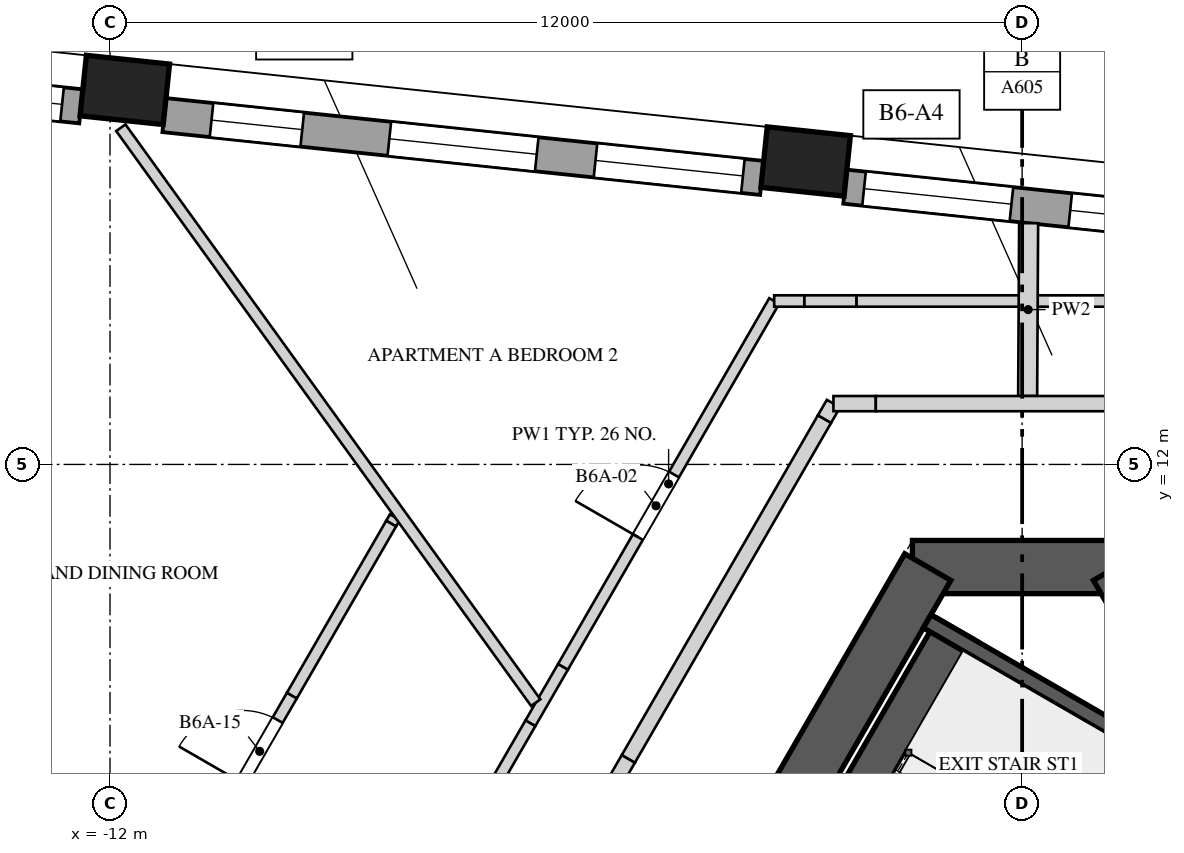
"""IFC4 building model, lengths in metres.
Left out: names, types, materials, properties, quantities, classifications, styles, units other than length and angle.
Written with IfcOpenShell. Run it as: python <this file> out.ifc"""

import sys

from ifc_helpers import new_model, si_unit, direction, frame, frame_2d, origin, origin_2d, place, context, subcontext, project, spatial, polyline, rectangle, outline, extrude, element, fill, save


model = new_model("IFC4")
c1 = context("Model", 3, precision=1e-05, world=origin(), true_north=direction((0.0, 1.0)))
c2 = subcontext(c1, "Body", "Model", "MODEL_VIEW")
j1 = project(units=[si_unit("LENGTHUNIT", "METRE"), si_unit("PLANEANGLEUNIT", "RADIAN")], contexts=[c1])
p1 = place(None, origin())
s1 = spatial("IfcSite", under=j1, at=p1, CompositionType="ELEMENT")
p2 = place(p1, origin())
s2 = spatial("IfcBuilding", under=s1, at=p2, CompositionType="ELEMENT")
p3 = place(p2, frame((0.0, 0.0, 241.2)))
s3 = spatial("IfcBuildingStorey", under=s2, at=p3, CompositionType="ELEMENT", Elevation=241.2)
p4 = place(p3, frame((1.443, 10.65, 0.0), z_axis=(0.0, 0.0, 1.0), x_axis=(-1.0, 0.0, 0.0)))
e1 = element("IfcWall", 1, at=p4, inside=s3, PredefinedType="SHEAR", context=c2, shape_type="SweptSolid", body=[
    extrude(rectangle(XDim=2.887, YDim=0.7, at=frame_2d((1.443, 0.0))), origin(), (0.0, 0.0, 1.0), 4.0),
])
p5 = place(p3, frame((-1.241, 10.65, 0.0), z_axis=(0.0, 0.0, 1.0), x_axis=(-0.500003331888, -0.866023480109, 0.0)))
e2 = element("IfcWall", 2, at=p5, inside=s3, PredefinedType="SHEAR", context=c2, shape_type="SweptSolid", body=[
    extrude(rectangle(XDim=17.205, YDim=0.7, at=frame_2d((8.603, 0.0))), origin(), (0.0, 0.0, 1.0), 4.0),
])
p6 = place(p5, frame((6.808, 0.0, 0.0)))
e3 = element("IfcOpeningElement", 3, at=p6, cuts=e2, PredefinedType="OPENING", context=c2, shape_type="SweptSolid", body=[
    extrude(rectangle(XDim=1.0, YDim=2.4, at=frame_2d((0.5, 1.2))), frame((0.0, 0.36, 0.0), z_axis=(0.0, -1.0, 0.0), x_axis=(1.0, 0.0, 0.0)), (0.0, 0.0, 1.0), 0.72),
])
p7 = place(p5, frame((14.922, 0.0, 0.0)))
e4 = element("IfcOpeningElement", 4, at=p7, cuts=e2, PredefinedType="OPENING", context=c2, shape_type="SweptSolid", body=[
    extrude(rectangle(XDim=0.8, YDim=2.1, at=frame_2d((0.4, 1.05))), frame((0.0, 0.36, 0.0), z_axis=(0.0, -1.0, 0.0), x_axis=(1.0, 0.0, 0.0)), (0.0, 0.0, 1.0), 0.72),
])
p8 = place(p3, frame((9.844, -4.25, 0.0), z_axis=(0.0, 0.0, 1.0), x_axis=(-0.500003331888, 0.866023480109, 0.0)))
e5 = element("IfcWall", 5, at=p8, inside=s3, PredefinedType="SHEAR", context=c2, shape_type="SweptSolid", body=[
    extrude(rectangle(XDim=17.205, YDim=0.7, at=frame_2d((8.603, 0.0))), origin(), (0.0, 0.0, 1.0), 4.0),
])
p9 = place(p8, frame((6.877, 0.0, 0.0)))
e6 = element("IfcOpeningElement", 6, at=p9, cuts=e5, PredefinedType="OPENING", context=c2, shape_type="SweptSolid", body=[
    extrude(rectangle(XDim=1.0, YDim=2.4, at=frame_2d((0.5, 1.2))), frame((0.0, 0.36, 0.0), z_axis=(0.0, -1.0, 0.0), x_axis=(1.0, 0.0, 0.0)), (0.0, 0.0, 1.0), 0.72),
])
for number, where, z_axis, x_axis in (
    (7, (-2.848, 15.985, 0.0), (0.0, 0.0, 1.0), (-0.995, 0.105, 0.0)),
    (8, (-11.805, 16.927, 0.0), (0.0, 0.0, 1.0), (-0.995, 0.105, 0.0)),
):
    element("IfcColumn", number, at=place(p3, frame(where, z_axis=z_axis, x_axis=x_axis)), inside=s3, PredefinedType="COLUMN", context=c2, shape_type="SweptSolid", body=[
        extrude(rectangle(XDim=1.1, YDim=0.8, at=origin_2d()), origin(), (0.0, 0.0, 1.0), 4.0),
    ])
p10 = place(p3, frame((5.534, 14.828, 0.0), z_axis=(0.0, 0.0, 1.0), x_axis=(-0.994522865711, 0.104519230663, 0.0)))
e9 = element("IfcWall", 9, at=p10, inside=s3, PredefinedType="SOLIDWALL", context=c2, shape_type="SweptSolid", body=[
    extrude(rectangle(XDim=7.907, YDim=0.45, at=frame_2d((3.953, 0.0))), origin(), (0.0, 0.0, 1.0), 3.3),
])
p11 = place(p10, frame((0.251, 0.0, 0.4)))
e10 = element("IfcOpeningElement", 10, at=p11, cuts=e9, PredefinedType="OPENING", context=c2, shape_type="SweptSolid", body=[
    extrude(rectangle(XDim=1.95, YDim=2.75, at=frame_2d((0.975, 1.375))), frame((0.0, 0.235, 0.0), z_axis=(0.0, -1.0, 0.0), x_axis=(1.0, 0.0, 0.0)), (0.0, 0.0, 1.0), 0.47),
])
p12 = place(p10, frame((2.978, 0.0, 0.4)))
e11 = element("IfcOpeningElement", 11, at=p12, cuts=e9, PredefinedType="OPENING", context=c2, shape_type="SweptSolid", body=[
    extrude(rectangle(XDim=1.95, YDim=2.75, at=frame_2d((0.975, 1.375))), frame((0.0, 0.235, 0.0), z_axis=(0.0, -1.0, 0.0), x_axis=(1.0, 0.0, 0.0)), (0.0, 0.0, 1.0), 0.47),
])
p13 = place(p10, frame((5.706, 0.0, 0.4)))
e12 = element("IfcOpeningElement", 12, at=p13, cuts=e9, PredefinedType="OPENING", context=c2, shape_type="SweptSolid", body=[
    extrude(rectangle(XDim=1.95, YDim=2.75, at=frame_2d((0.975, 1.375))), frame((0.0, 0.235, 0.0), z_axis=(0.0, -1.0, 0.0), x_axis=(1.0, 0.0, 0.0)), (0.0, 0.0, 1.0), 0.47),
])
p14 = place(p3, frame((-3.424, 15.769, 0.0), z_axis=(0.0, 0.0, 1.0), x_axis=(-0.994522528385, 0.104522440343, 0.0)))
e13 = element("IfcWall", 13, at=p14, inside=s3, PredefinedType="SOLIDWALL", context=c2, shape_type="SweptSolid", body=[
    extrude(rectangle(XDim=7.906, YDim=0.45, at=frame_2d((3.953, 0.0))), origin(), (0.0, 0.0, 1.0), 3.3),
])
p15 = place(p14, frame((0.251, 0.0, 0.4)))
e14 = element("IfcOpeningElement", 14, at=p15, cuts=e13, PredefinedType="OPENING", context=c2, shape_type="SweptSolid", body=[
    extrude(rectangle(XDim=1.95, YDim=2.75, at=frame_2d((0.975, 1.375))), frame((0.0, 0.235, 0.0), z_axis=(0.0, -1.0, 0.0), x_axis=(1.0, 0.0, 0.0)), (0.0, 0.0, 1.0), 0.47),
])
p16 = place(p14, frame((2.978, 0.0, 0.4)))
e15 = element("IfcOpeningElement", 15, at=p16, cuts=e13, PredefinedType="OPENING", context=c2, shape_type="SweptSolid", body=[
    extrude(rectangle(XDim=1.95, YDim=2.75, at=frame_2d((0.975, 1.375))), frame((0.0, 0.235, 0.0), z_axis=(0.0, -1.0, 0.0), x_axis=(1.0, 0.0, 0.0)), (0.0, 0.0, 1.0), 0.47),
])
p17 = place(p14, frame((6.081, 0.0, 0.4)))
e16 = element("IfcOpeningElement", 16, at=p17, cuts=e13, PredefinedType="OPENING", context=c2, shape_type="SweptSolid", body=[
    extrude(rectangle(XDim=1.2, YDim=2.75, at=frame_2d((0.6, 1.375))), frame((0.0, 0.235, 0.0), z_axis=(0.0, -1.0, 0.0), x_axis=(1.0, 0.0, 0.0)), (0.0, 0.0, 1.0), 0.47),
])
p18 = place(p3, frame((-12.381, 16.711, 0.0), z_axis=(0.0, 0.0, 1.0), x_axis=(-0.994520717537, 0.104539668977, 0.0)))
e17 = element("IfcWall", 17, at=p18, inside=s3, PredefinedType="SOLIDWALL", context=c2, shape_type="SweptSolid", body=[
    extrude(rectangle(XDim=2.452, YDim=0.45, at=frame_2d((1.226, 0.0))), origin(), (0.0, 0.0, 1.0), 3.3),
])
p19 = place(p18, frame((0.251, 0.0, 0.4)))
e18 = element("IfcOpeningElement", 18, at=p19, cuts=e17, PredefinedType="OPENING", context=c2, shape_type="SweptSolid", body=[
    extrude(rectangle(XDim=1.95, YDim=2.75, at=frame_2d((0.975, 1.375))), frame((0.0, 0.235, 0.0), z_axis=(0.0, -1.0, 0.0), x_axis=(1.0, 0.0, 0.0)), (0.0, 0.0, 1.0), 0.47),
])
p20 = place(p3, frame((-0.853, 9.823, 0.0), z_axis=(0.0, 0.0, 1.0), x_axis=(-0.500009909098, -0.866019682689, 0.0)))
e19 = element("IfcWall", 19, at=p20, inside=s3, PredefinedType="SOLIDWALL", context=c2, shape_type="SweptSolid", body=[
    extrude(rectangle(XDim=6.2, YDim=0.6, at=frame_2d((3.1, 0.0))), origin(), (0.0, 0.0, 1.0), 3.65),
])
p21 = place(p3, frame((1.876, 8.85, 0.0), z_axis=(0.0, 0.0, 1.0), x_axis=(-0.499998042495, -0.866026533947, 0.0)))
e20 = element("IfcWall", 20, at=p21, inside=s3, PredefinedType="SOLIDWALL", context=c2, shape_type="SweptSolid", body=[
    extrude(rectangle(XDim=6.723, YDim=0.2, at=frame_2d((3.361, 0.0))), origin(), (0.0, 0.0, 1.0), 3.65),
])
p22 = place(p3, frame((1.479, 8.361, 0.0), z_axis=(0.0, 0.0, 1.0), x_axis=(-0.866035871367, 0.499981869177, 0.0)))
e21 = element("IfcWall", 21, at=p22, inside=s3, PredefinedType="SOLIDWALL", context=c2, shape_type="SweptSolid", body=[
    extrude(rectangle(XDim=3.15, YDim=0.2, at=frame_2d((1.575, 0.0))), origin(), (0.0, 0.0, 1.0), 3.65),
])
p23 = place(p3, frame((-7.38, 7.017, 0.0), z_axis=(0.0, 0.0, 1.0), x_axis=(0.500012159746, 0.866018383238, 0.0)))
e22 = element("IfcWall", 22, at=p23, inside=s3, PredefinedType="PARTITIONING", context=c2, shape_type="SweptSolid", body=[
    extrude(rectangle(XDim=1.824, YDim=0.15, at=frame_2d((0.912, 0.0))), origin(), (0.0, 0.0, 1.0), 3.65),
])
p24 = place(p3, frame((-6.468, 8.597, 0.0), z_axis=(0.0, 0.0, 1.0), x_axis=(0.500035209441, 0.86600507465, 0.0)))
e23 = element("IfcWall", 23, at=p24, inside=s3, PredefinedType="PARTITIONING", context=c2, shape_type="SweptSolid", body=[
    extrude(rectangle(XDim=0.856, YDim=0.15, at=frame_2d((0.428, 0.0))), origin(), (0.0, 0.0, 1.0), 2.75),
])
p25 = place(p3, frame((-6.04, 9.338, 0.0), z_axis=(0.0, 0.0, 1.0), x_axis=(0.500014044516, 0.866017295027, 0.0)))
e24 = element("IfcWall", 24, at=p25, inside=s3, PredefinedType="PARTITIONING", context=c2, shape_type="SweptSolid", body=[
    extrude(rectangle(XDim=5.556, YDim=0.15, at=frame_2d((2.778, 0.0))), origin(), (0.0, 0.0, 1.0), 3.65),
])
p26 = place(p25, frame((1.971, 0.0, 0.0)))
e25 = element("IfcOpeningElement", 25, at=p26, cuts=e24, PredefinedType="OPENING", context=c2, shape_type="SweptSolid", body=[
    extrude(rectangle(XDim=0.95, YDim=2.4, at=frame_2d((0.475, 1.2))), frame((0.0, 0.085, 0.0), z_axis=(0.0, -1.0, 0.0), x_axis=(1.0, 0.0, 0.0)), (0.0, 0.0, 1.0), 0.17),
])
p27 = place(p3, frame((-10.294, 7.771, 0.0), z_axis=(0.0, 0.0, 1.0), x_axis=(0.500117582512, 0.865957506846, 0.0)))
e26 = element("IfcWall", 26, at=p27, inside=s3, PredefinedType="PARTITIONING", context=c2, shape_type="SweptSolid", body=[
    extrude(outline(polyline([(0.0, 0.0), (1.373, 0.0), (1.373, 2.55), (0.481, 2.55), (0.481, 3.65), (0.0, 3.65), (0.0, 0.0)])), frame((0.0, 0.075, 0.0), z_axis=(0.0, -1.0, 0.0), x_axis=(1.0, 0.0, 0.0)), (0.0, 0.0, 1.0), 0.15),
])
p28 = place(p27, frame((0.05, 0.0, 0.0)))
e27 = element("IfcOpeningElement", 27, at=p28, cuts=e26, PredefinedType="OPENING", context=c2, shape_type="SweptSolid", body=[
    extrude(rectangle(XDim=0.95, YDim=2.4, at=frame_2d((0.475, 1.2))), frame((0.0, 0.085, 0.0), z_axis=(0.0, -1.0, 0.0), x_axis=(1.0, 0.0, 0.0)), (0.0, 0.0, 1.0), 0.17),
])
p29 = place(p3, frame((-9.607, 8.96, 0.0), z_axis=(0.0, 0.0, 1.0), x_axis=(0.49994612994, 0.866056503444, 0.0)))
e28 = element("IfcWall", 28, at=p29, inside=s3, PredefinedType="PARTITIONING", context=c2, shape_type="SweptSolid", body=[
    extrude(rectangle(XDim=2.614, YDim=0.15, at=frame_2d((1.307, 0.0))), origin(), (0.0, 0.0, 1.0), 3.65),
])
p30 = place(p3, frame((-8.3, 11.224, 0.0), z_axis=(0.0, 0.0, 1.0), x_axis=(0.501641482138, 0.865075617156, 0.0)))
e29 = element("IfcWall", 29, at=p30, inside=s3, PredefinedType="PARTITIONING", context=c2, shape_type="SweptSolid", body=[
    extrude(rectangle(XDim=0.095, YDim=0.15, at=frame_2d((0.048, 0.0))), origin(), (0.0, 0.0, 1.0), 2.75),
])
p31 = place(p3, frame((-11.858, 16.429, 0.0), z_axis=(0.0, 0.0, 1.0), x_axis=(0.585232485498, -0.810865548607, 0.0)))
e30 = element("IfcWall", 30, at=p31, inside=s3, PredefinedType="PARTITIONING", context=c2, shape_type="SweptSolid", body=[
    extrude(rectangle(XDim=9.327, YDim=0.15, at=frame_2d((4.664, 0.0))), origin(), (0.0, 0.0, 1.0), 2.75),
])
p32 = place(p3, frame((-3.262, 14.15, 0.0), z_axis=(0.0, 0.0, 1.0), x_axis=(1.0, 0.0, 0.0)))
e31 = element("IfcWall", 31, at=p32, inside=s3, PredefinedType="PARTITIONING", context=c2, shape_type="SweptSolid", body=[
    extrude(rectangle(XDim=0.398, YDim=0.15, at=frame_2d((0.199, 0.0))), origin(), (0.0, 0.0, 1.0), 3.65),
])
p33 = place(p3, frame((-2.864, 14.15, 0.0), z_axis=(0.0, 0.0, 1.0), x_axis=(1.0, 0.0, 0.0)))
e32 = element("IfcWall", 32, at=p33, inside=s3, PredefinedType="PARTITIONING", context=c2, shape_type="SweptSolid", body=[
    extrude(rectangle(XDim=0.686, YDim=0.15, at=frame_2d((0.343, 0.0))), origin(), (0.0, 0.0, 1.0), 2.95),
])
p34 = place(p3, frame((-2.178, 14.15, 0.0), z_axis=(0.0, 0.0, 1.0), x_axis=(1.0, 0.0, 0.0)))
e33 = element("IfcWall", 33, at=p34, inside=s3, PredefinedType="PARTITIONING", context=c2, shape_type="SweptSolid", body=[
    extrude(rectangle(XDim=5.44, YDim=0.15, at=frame_2d((2.72, 0.0))), origin(), (0.0, 0.0, 1.0), 3.65),
])
p35 = place(p3, frame((0.085, 15.174, 0.0), z_axis=(0.0, 0.0, 1.0), x_axis=(-0.005582307008, -0.999984418803, 0.0)))
e34 = element("IfcWall", 34, at=p35, inside=s3, PredefinedType="SOLIDWALL", context=c2, shape_type="SweptSolid", body=[
    extrude(rectangle(XDim=2.274, YDim=0.25, at=frame_2d((1.137, 0.0))), origin(), (0.0, 0.0, 1.0), 3.65),
])
p36 = place(p3, frame((-5.622, 7.362, 0.0), z_axis=(0.0, 0.0, 1.0), x_axis=(0.500121072013, 0.86595549154, 0.0)))
e35 = element("IfcWall", 35, at=p36, inside=s3, PredefinedType="SOLIDWALL", context=c2, shape_type="SweptSolid", body=[
    extrude(rectangle(XDim=0.884, YDim=0.2, at=frame_2d((0.442, 0.0))), origin(), (0.0, 0.0, 1.0), 2.75),
])
p37 = place(p3, frame((-5.18, 8.127, 0.0), z_axis=(0.0, 0.0, 1.0), x_axis=(0.499995433041, 0.866028040503, 0.0)))
e36 = element("IfcWall", 36, at=p37, inside=s3, PredefinedType="SOLIDWALL", context=c2, shape_type="SweptSolid", body=[
    extrude(rectangle(XDim=5.161, YDim=0.2, at=frame_2d((2.581, 0.0))), origin(), (0.0, 0.0, 1.0), 3.65),
])
p38 = place(p3, frame((-2.6, 12.597, 0.0), z_axis=(0.0, 0.0, 1.0), x_axis=(0.49972245349, 0.866185586049, 0.0)))
e37 = element("IfcWall", 37, at=p38, inside=s3, PredefinedType="SOLIDWALL", context=c2, shape_type="SweptSolid", body=[
    extrude(rectangle(XDim=0.235, YDim=0.2, at=frame_2d((0.117, 0.0))), origin(), (0.0, 0.0, 1.0), 2.95),
])
p39 = place(p3, frame((-2.483, 12.8, 0.0), z_axis=(0.0, 0.0, 1.0), x_axis=(1.0, 0.0, 0.0)))
e38 = element("IfcWall", 38, at=p39, inside=s3, PredefinedType="SOLIDWALL", context=c2, shape_type="SweptSolid", body=[
    extrude(rectangle(XDim=0.558, YDim=0.2, at=frame_2d((0.279, 0.0))), origin(), (0.0, 0.0, 1.0), 2.95),
])
p40 = place(p3, frame((-1.925, 12.8, 0.0), z_axis=(0.0, 0.0, 1.0), x_axis=(1.0, 0.0, 0.0)))
e39 = element("IfcWall", 39, at=p40, inside=s3, PredefinedType="SOLIDWALL", context=c2, shape_type="SweptSolid", body=[
    extrude(rectangle(XDim=4.408, YDim=0.2, at=frame_2d((2.204, 0.0))), origin(), (0.0, 0.0, 1.0), 3.65),
])
p41 = place(p12, origin())
e40 = element("IfcWindow", 40, at=p41, inside=s3, PartitioningType="SINGLE_PANEL", PredefinedType="WINDOW", context=c2, shape_type="SweptSolid", body=[
    extrude(rectangle(XDim=1.95, YDim=2.75, at=frame_2d((0.975, 1.375))), frame((0.0, 0.03, 0.0), z_axis=(0.0, -1.0, 0.0), x_axis=(1.0, 0.0, 0.0)), (0.0, 0.0, 1.0), 0.06),
])
fill(e11, e40)
p42 = place(p13, origin())
e41 = element("IfcWindow", 41, at=p42, inside=s3, PartitioningType="SINGLE_PANEL", PredefinedType="WINDOW", context=c2, shape_type="SweptSolid", body=[
    extrude(rectangle(XDim=1.95, YDim=2.75, at=frame_2d((0.975, 1.375))), frame((0.0, 0.03, 0.0), z_axis=(0.0, -1.0, 0.0), x_axis=(1.0, 0.0, 0.0)), (0.0, 0.0, 1.0), 0.06),
])
fill(e12, e41)
p43 = place(p15, origin())
e42 = element("IfcWindow", 42, at=p43, inside=s3, PartitioningType="SINGLE_PANEL", PredefinedType="WINDOW", context=c2, shape_type="SweptSolid", body=[
    extrude(rectangle(XDim=1.95, YDim=2.75, at=frame_2d((0.975, 1.375))), frame((0.0, 0.03, 0.0), z_axis=(0.0, -1.0, 0.0), x_axis=(1.0, 0.0, 0.0)), (0.0, 0.0, 1.0), 0.06),
])
fill(e14, e42)
p44 = place(p16, origin())
e43 = element("IfcWindow", 43, at=p44, inside=s3, PartitioningType="SINGLE_PANEL", PredefinedType="WINDOW", context=c2, shape_type="SweptSolid", body=[
    extrude(rectangle(XDim=1.95, YDim=2.75, at=frame_2d((0.975, 1.375))), frame((0.0, 0.03, 0.0), z_axis=(0.0, -1.0, 0.0), x_axis=(1.0, 0.0, 0.0)), (0.0, 0.0, 1.0), 0.06),
])
fill(e15, e43)
p45 = place(p17, origin())
e44 = element("IfcWindow", 44, at=p45, inside=s3, PartitioningType="SINGLE_PANEL", PredefinedType="WINDOW", context=c2, shape_type="SweptSolid", body=[
    extrude(rectangle(XDim=1.2, YDim=2.75, at=frame_2d((0.6, 1.375))), frame((0.0, 0.03, 0.0), z_axis=(0.0, -1.0, 0.0), x_axis=(1.0, 0.0, 0.0)), (0.0, 0.0, 1.0), 0.06),
])
fill(e16, e44)
p46 = place(p19, origin())
e45 = element("IfcWindow", 45, at=p46, inside=s3, PartitioningType="SINGLE_PANEL", PredefinedType="WINDOW", context=c2, shape_type="SweptSolid", body=[
    extrude(rectangle(XDim=1.95, YDim=2.75, at=frame_2d((0.975, 1.375))), frame((0.0, 0.03, 0.0), z_axis=(0.0, -1.0, 0.0), x_axis=(1.0, 0.0, 0.0)), (0.0, 0.0, 1.0), 0.06),
])
fill(e18, e45)
p47 = place(p26, origin())
e46 = element("IfcDoor", 46, at=p47, inside=s3, OperationType="SINGLE_SWING_RIGHT", PredefinedType="DOOR", context=c2, shape_type="SweptSolid", body=[
    extrude(rectangle(XDim=0.95, YDim=2.4, at=frame_2d((0.475, 1.2))), frame((0.0, 0.025, 0.0), z_axis=(0.0, -1.0, 0.0), x_axis=(1.0, 0.0, 0.0)), (0.0, 0.0, 1.0), 0.05),
])
fill(e25, e46)
p48 = place(p28, origin())
e47 = element("IfcDoor", 47, at=p48, inside=s3, OperationType="SINGLE_SWING_LEFT", PredefinedType="DOOR", context=c2, shape_type="SweptSolid", body=[
    extrude(rectangle(XDim=0.95, YDim=2.4, at=frame_2d((0.475, 1.2))), frame((0.0, 0.025, 0.0), z_axis=(0.0, -1.0, 0.0), x_axis=(1.0, 0.0, 0.0)), (0.0, 0.0, 1.0), 0.05),
])
fill(e27, e47)
save(model, sys.argv[1])
